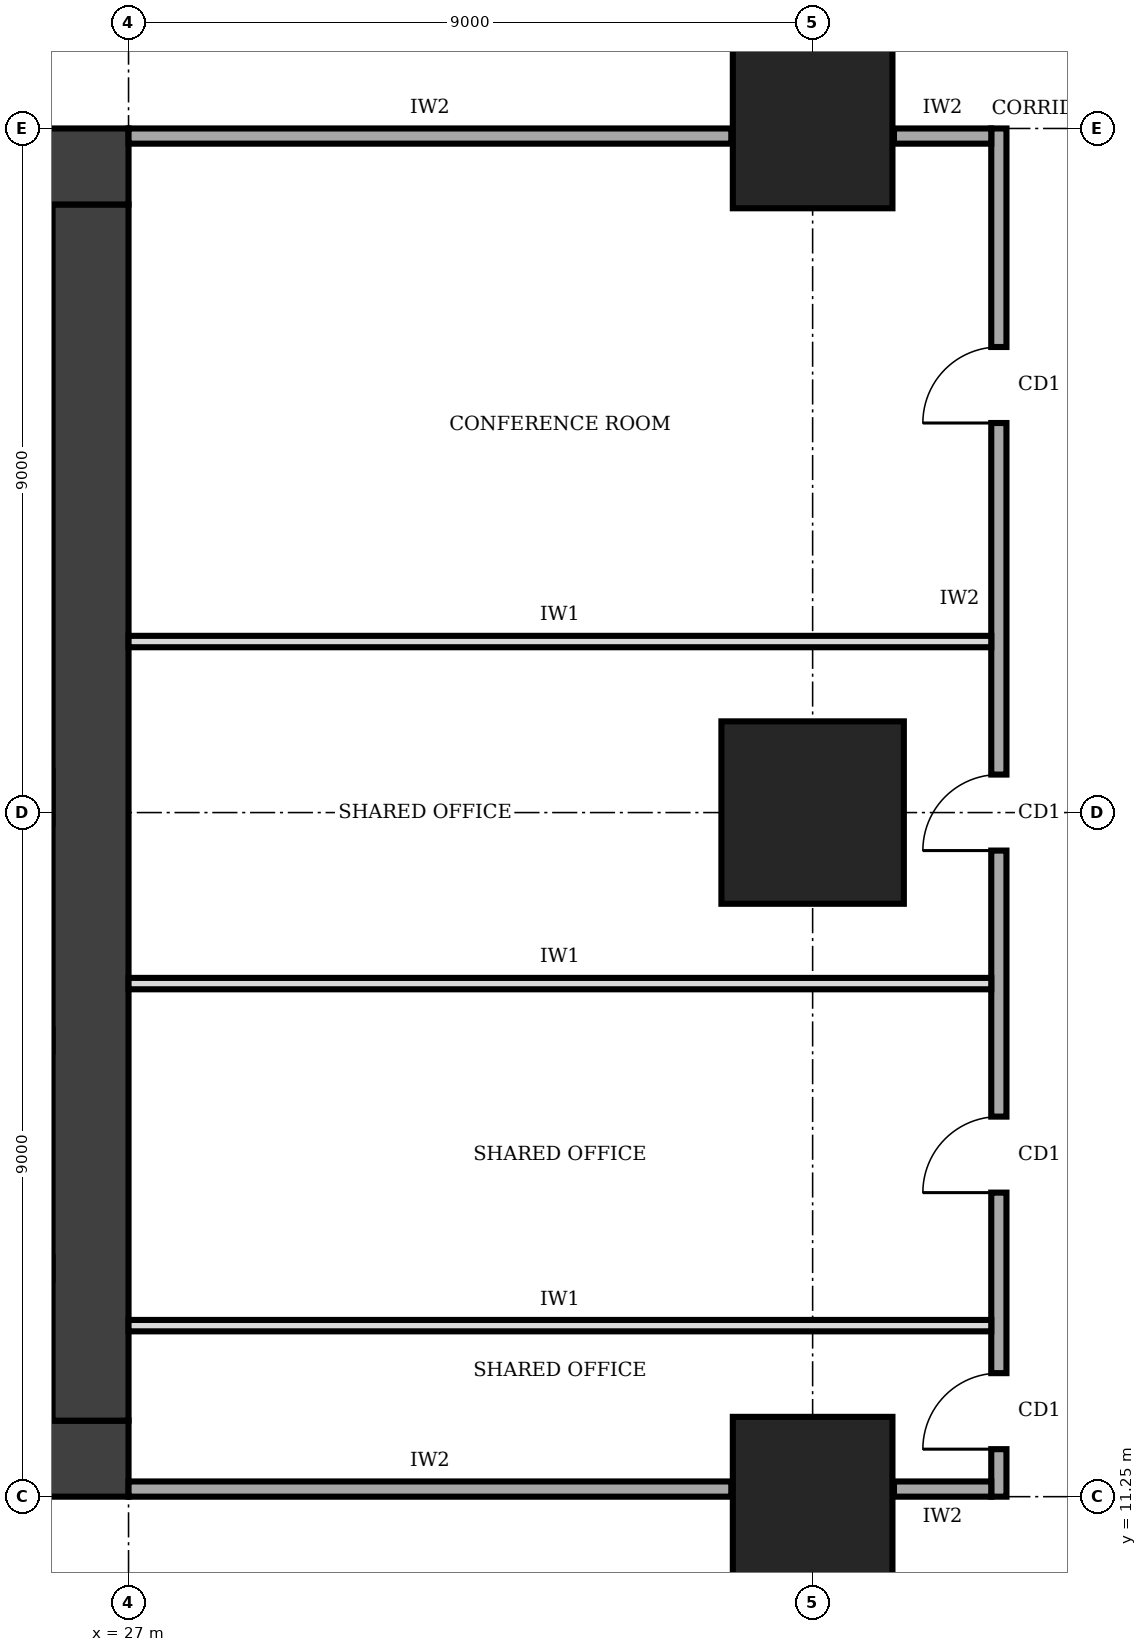
"""IFC4 building model, lengths in metres.
Left out: names, types, materials, properties, quantities, classifications, styles, units other than length and angle.
Written with IfcOpenShell. Run it as: python <this file> out.ifc"""

import sys

from ifc_helpers import new_model, si_unit, direction, frame, frame_2d, origin, origin_2d, place, context, subcontext, project, spatial, rectangle, extrude, element, fill, save


model = new_model("IFC4")
c1 = context("Model", 3, precision=1e-05, world=origin(), true_north=direction((0.0, 1.0)))
c2 = subcontext(c1, "Body", "Model", "MODEL_VIEW")
j1 = project(units=[si_unit("LENGTHUNIT", "METRE"), si_unit("PLANEANGLEUNIT", "RADIAN")], contexts=[c1])
p1 = place(None, origin())
s1 = spatial("IfcSite", under=j1, at=p1, CompositionType="ELEMENT")
p2 = place(p1, origin())
s2 = spatial("IfcBuilding", under=s1, at=p2, CompositionType="ELEMENT")
p3 = place(p2, frame((0.0, 0.0, 149.0)))
s3 = spatial("IfcBuildingStorey", under=s2, at=p3, CompositionType="ELEMENT", Elevation=149.0)
p4 = place(p3, frame((13.5, 11.75, 0.0), z_axis=(0.0, 0.0, 1.0), x_axis=(1.0, 0.0, 0.0)))
e1 = element("IfcWall", 1, at=p4, inside=s3, PredefinedType="SHEAR", context=c2, shape_type="SweptSolid", body=[
    extrude(rectangle(XDim=13.5, YDim=1.0, at=frame_2d((6.75, 0.0))), origin(), (0.0, 0.0, 1.0), 4.0),
])
p5 = place(p4, frame((4.75, 0.0, 0.0)))
e2 = element("IfcOpeningElement", 2, at=p5, cuts=e1, PredefinedType="OPENING", context=c2, shape_type="SweptSolid", body=[
    extrude(rectangle(XDim=1.0, YDim=2.1, at=frame_2d((0.5, 1.05))), frame((0.0, 0.51, 0.0), z_axis=(0.0, -1.0, 0.0), x_axis=(1.0, 0.0, 0.0)), (0.0, 0.0, 1.0), 1.02),
])
p6 = place(p3, frame((26.5, 12.25, 0.0), z_axis=(0.0, 0.0, 1.0), x_axis=(0.0, 1.0, 0.0)))
e3 = element("IfcWall", 3, at=p6, inside=s3, PredefinedType="SHEAR", context=c2, shape_type="SweptSolid", body=[
    extrude(rectangle(XDim=16.0, YDim=1.0, at=frame_2d((8.0, 0.0))), origin(), (0.0, 0.0, 1.0), 4.0),
])
p7 = place(p3, frame((27.0, 28.75, 0.0), z_axis=(0.0, 0.0, 1.0), x_axis=(-1.0, 0.0, 0.0)))
e4 = element("IfcWall", 4, at=p7, inside=s3, PredefinedType="SHEAR", context=c2, shape_type="SweptSolid", body=[
    extrude(rectangle(XDim=13.5, YDim=1.0, at=frame_2d((6.75, 0.0))), origin(), (0.0, 0.0, 1.0), 4.0),
])
p8 = place(p7, frame((4.75, 0.0, 0.0)))
e5 = element("IfcOpeningElement", 5, at=p8, cuts=e4, PredefinedType="OPENING", context=c2, shape_type="SweptSolid", body=[
    extrude(rectangle(XDim=1.8, YDim=2.1, at=frame_2d((0.9, 1.05))), frame((0.0, 0.51, 0.0), z_axis=(0.0, -1.0, 0.0), x_axis=(1.0, 0.0, 0.0)), (0.0, 0.0, 1.0), 1.02),
])
p9 = place(p3, frame((36.0, 11.25, 0.0), z_axis=(0.0, 0.0, 1.0), x_axis=(1.0, 0.0, 0.0)))
e6 = element("IfcColumn", 6, at=p9, inside=s3, PredefinedType="COLUMN", context=c2, shape_type="SweptSolid", body=[
    extrude(rectangle(XDim=2.1, YDim=2.1, at=origin_2d()), origin(), (0.0, 0.0, 1.0), 4.0),
])
p10 = place(p3, frame((36.0, 20.25, 0.0), z_axis=(0.0, 0.0, 1.0), x_axis=(1.0, 0.0, 0.0)))
e7 = element("IfcColumn", 7, at=p10, inside=s3, PredefinedType="COLUMN", context=c2, shape_type="SweptSolid", body=[
    extrude(rectangle(XDim=2.4, YDim=2.4, at=origin_2d()), origin(), (0.0, 0.0, 1.0), 4.0),
])
p11 = place(p3, frame((36.0, 29.25, 0.0), z_axis=(0.0, 0.0, 1.0), x_axis=(1.0, 0.0, 0.0)))
e8 = element("IfcColumn", 8, at=p11, inside=s3, PredefinedType="COLUMN", context=c2, shape_type="SweptSolid", body=[
    extrude(rectangle(XDim=2.1, YDim=2.1, at=origin_2d()), origin(), (0.0, 0.0, 1.0), 4.0),
])
p12 = place(p3, frame((38.45, 11.25, 0.0), z_axis=(0.0, 0.0, 1.0), x_axis=(0.0, 1.0, 0.0)))
e9 = element("IfcWall", 9, at=p12, inside=s3, PredefinedType="SOLIDWALL", context=c2, shape_type="SweptSolid", body=[
    extrude(rectangle(XDim=18.0, YDim=0.2, at=frame_2d((9.0, 0.0))), origin(), (0.0, 0.0, 1.0), 3.75),
])
p13 = place(p12, frame((0.625, 0.0, 0.0)))
e10 = element("IfcOpeningElement", 10, at=p13, cuts=e9, PredefinedType="OPENING", context=c2, shape_type="SweptSolid", body=[
    extrude(rectangle(XDim=1.0, YDim=2.1, at=frame_2d((0.5, 1.05))), frame((0.0, 0.11, 0.0), z_axis=(0.0, -1.0, 0.0), x_axis=(1.0, 0.0, 0.0)), (0.0, 0.0, 1.0), 0.22),
])
p14 = place(p12, frame((4.0, 0.0, 0.0)))
e11 = element("IfcOpeningElement", 11, at=p14, cuts=e9, PredefinedType="OPENING", context=c2, shape_type="SweptSolid", body=[
    extrude(rectangle(XDim=1.0, YDim=2.1, at=frame_2d((0.5, 1.05))), frame((0.0, 0.11, 0.0), z_axis=(0.0, -1.0, 0.0), x_axis=(1.0, 0.0, 0.0)), (0.0, 0.0, 1.0), 0.22),
])
p15 = place(p12, frame((8.5, 0.0, 0.0)))
e12 = element("IfcOpeningElement", 12, at=p15, cuts=e9, PredefinedType="OPENING", context=c2, shape_type="SweptSolid", body=[
    extrude(rectangle(XDim=1.0, YDim=2.1, at=frame_2d((0.5, 1.05))), frame((0.0, 0.11, 0.0), z_axis=(0.0, -1.0, 0.0), x_axis=(1.0, 0.0, 0.0)), (0.0, 0.0, 1.0), 0.22),
])
p16 = place(p12, frame((14.125, 0.0, 0.0)))
e13 = element("IfcOpeningElement", 13, at=p16, cuts=e9, PredefinedType="OPENING", context=c2, shape_type="SweptSolid", body=[
    extrude(rectangle(XDim=1.0, YDim=2.1, at=frame_2d((0.5, 1.05))), frame((0.0, 0.11, 0.0), z_axis=(0.0, -1.0, 0.0), x_axis=(1.0, 0.0, 0.0)), (0.0, 0.0, 1.0), 0.22),
])
p17 = place(p3, frame((27.0, 11.35, 0.0), z_axis=(0.0, 0.0, 1.0), x_axis=(1.0, 0.0, 0.0)))
e14 = element("IfcWall", 14, at=p17, inside=s3, PredefinedType="SOLIDWALL", context=c2, shape_type="SweptSolid", body=[
    extrude(rectangle(XDim=7.93, YDim=0.2, at=frame_2d((3.965, 0.0))), origin(), (0.0, 0.0, 1.0), 2.85),
])
p18 = place(p3, frame((37.07, 11.35, 0.0), z_axis=(0.0, 0.0, 1.0), x_axis=(1.0, 0.0, 0.0)))
e15 = element("IfcWall", 15, at=p18, inside=s3, PredefinedType="SOLIDWALL", context=c2, shape_type="SweptSolid", body=[
    extrude(rectangle(XDim=1.28, YDim=0.2, at=frame_2d((0.64, 0.0))), origin(), (0.0, 0.0, 1.0), 2.85),
])
p19 = place(p3, frame((27.0, 29.15, 0.0), z_axis=(0.0, 0.0, 1.0), x_axis=(1.0, 0.0, 0.0)))
e16 = element("IfcWall", 16, at=p19, inside=s3, PredefinedType="SOLIDWALL", context=c2, shape_type="SweptSolid", body=[
    extrude(rectangle(XDim=7.93, YDim=0.2, at=frame_2d((3.965, 0.0))), origin(), (0.0, 0.0, 1.0), 2.85),
])
p20 = place(p3, frame((37.07, 29.15, 0.0), z_axis=(0.0, 0.0, 1.0), x_axis=(1.0, 0.0, 0.0)))
e17 = element("IfcWall", 17, at=p20, inside=s3, PredefinedType="SOLIDWALL", context=c2, shape_type="SweptSolid", body=[
    extrude(rectangle(XDim=1.28, YDim=0.2, at=frame_2d((0.64, 0.0))), origin(), (0.0, 0.0, 1.0), 2.85),
])
for number, where, z_axis, x_axis in (
    (18, (27.0, 13.5, 0.0), (0.0, 0.0, 1.0), (1.0, 0.0, 0.0)),
    (19, (27.0, 18.0, 0.0), (0.0, 0.0, 1.0), (1.0, 0.0, 0.0)),
    (20, (27.0, 22.5, 0.0), (0.0, 0.0, 1.0), (1.0, 0.0, 0.0)),
):
    element("IfcWall", number, at=place(p3, frame(where, z_axis=z_axis, x_axis=x_axis)), inside=s3, PredefinedType="PARTITIONING", context=c2, shape_type="SweptSolid", body=[
        extrude(rectangle(XDim=11.35, YDim=0.15, at=frame_2d((5.675, 0.0))), origin(), (0.0, 0.0, 1.0), 3.75),
    ])
p21 = place(p13, origin())
e21 = element("IfcDoor", 21, at=p21, inside=s3, OperationType="SINGLE_SWING_LEFT", PredefinedType="DOOR", context=c2, shape_type="SweptSolid", body=[
    extrude(rectangle(XDim=1.0, YDim=2.1, at=frame_2d((0.5, 1.05))), frame((0.0, 0.025, 0.0), z_axis=(0.0, -1.0, 0.0), x_axis=(1.0, 0.0, 0.0)), (0.0, 0.0, 1.0), 0.05),
])
fill(e10, e21)
p22 = place(p14, origin())
e22 = element("IfcDoor", 22, at=p22, inside=s3, OperationType="SINGLE_SWING_LEFT", PredefinedType="DOOR", context=c2, shape_type="SweptSolid", body=[
    extrude(rectangle(XDim=1.0, YDim=2.1, at=frame_2d((0.5, 1.05))), frame((0.0, 0.025, 0.0), z_axis=(0.0, -1.0, 0.0), x_axis=(1.0, 0.0, 0.0)), (0.0, 0.0, 1.0), 0.05),
])
fill(e11, e22)
p23 = place(p15, origin())
e23 = element("IfcDoor", 23, at=p23, inside=s3, OperationType="SINGLE_SWING_LEFT", PredefinedType="DOOR", context=c2, shape_type="SweptSolid", body=[
    extrude(rectangle(XDim=1.0, YDim=2.1, at=frame_2d((0.5, 1.05))), frame((0.0, 0.025, 0.0), z_axis=(0.0, -1.0, 0.0), x_axis=(1.0, 0.0, 0.0)), (0.0, 0.0, 1.0), 0.05),
])
fill(e12, e23)
p24 = place(p16, origin())
e24 = element("IfcDoor", 24, at=p24, inside=s3, OperationType="SINGLE_SWING_LEFT", PredefinedType="DOOR", context=c2, shape_type="SweptSolid", body=[
    extrude(rectangle(XDim=1.0, YDim=2.1, at=frame_2d((0.5, 1.05))), frame((0.0, 0.025, 0.0), z_axis=(0.0, -1.0, 0.0), x_axis=(1.0, 0.0, 0.0)), (0.0, 0.0, 1.0), 0.05),
])
fill(e13, e24)
save(model, sys.argv[1])
